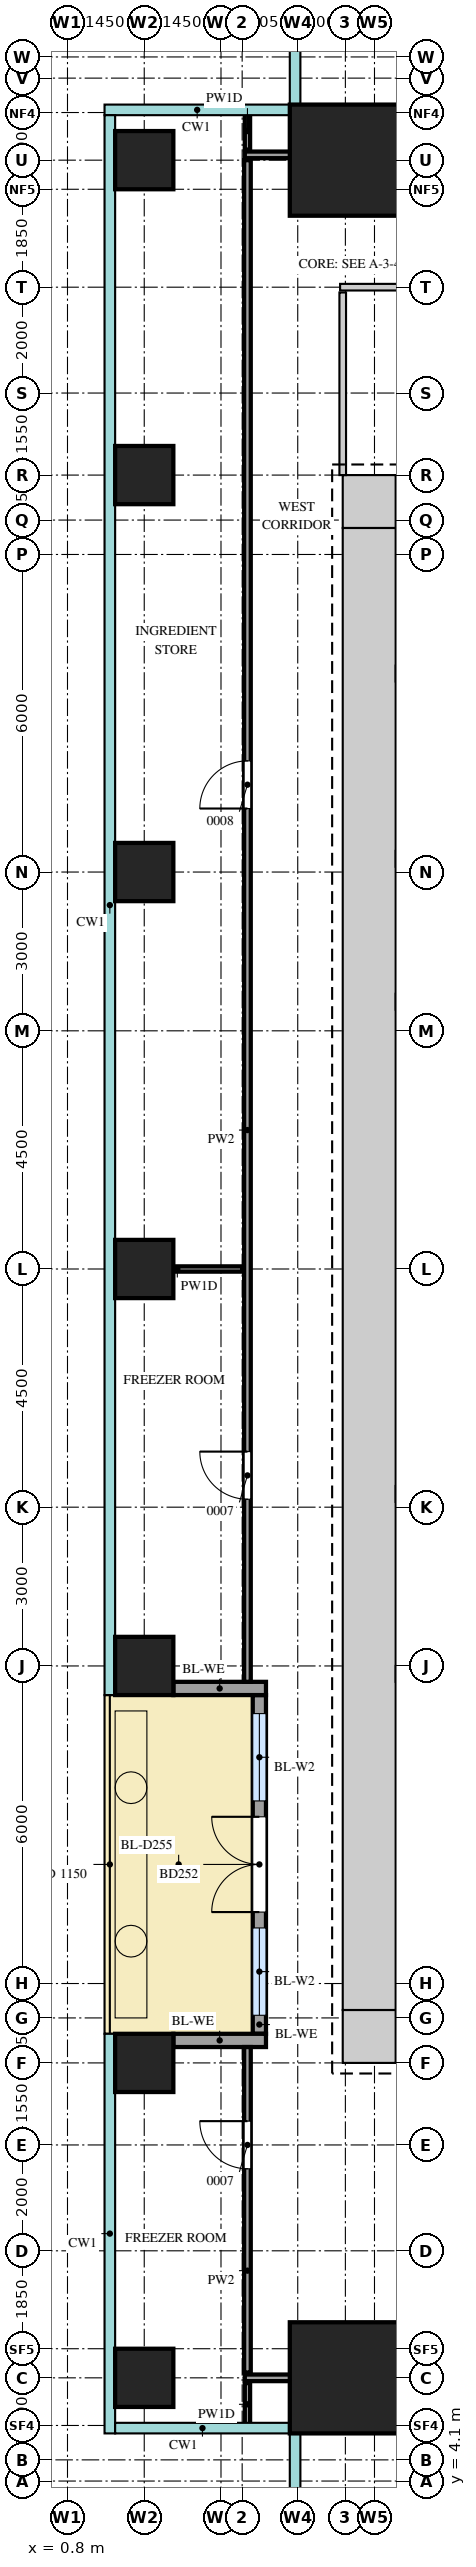
"""IFC4 building model, lengths in metres.
Left out: names, types, materials, properties, quantities, classifications, styles, units other than length and angle.
Written with IfcOpenShell. Run it as: python <this file> out.ifc"""

import sys

from ifc_helpers import new_model, si_unit, direction, frame, frame_2d, origin, origin_2d, place, context, subcontext, project, spatial, rectangle, extrude, source, transform, mapped, element, fill, save


model = new_model("IFC4")
c1 = context("Model", 3, precision=1e-05, world=origin(), true_north=direction((0.0, 1.0)))
c2 = subcontext(c1, "Body", "Model", "MODEL_VIEW")
j1 = project(units=[si_unit("LENGTHUNIT", "METRE"), si_unit("PLANEANGLEUNIT", "RADIAN")], contexts=[c1])
p1 = place(None, origin())
s1 = spatial("IfcSite", under=j1, at=p1, CompositionType="ELEMENT")
p2 = place(p1, origin())
s2 = spatial("IfcBuilding", under=s1, at=p2, CompositionType="ELEMENT")
p3 = place(p2, frame((0.0, 0.0, 119.1)))
s3 = spatial("IfcBuildingStorey", under=s2, at=p3, CompositionType="ELEMENT", Elevation=119.1)
m1 = source(origin(), c2, "Body", "SweptSolid", [
    extrude(rectangle(XDim=1.0, YDim=1.0, at=frame_2d((0.5, 0.0))), origin(), (0.0, 0.0, 1.0), 4.1),
])
for number, where, z_axis, x_axis in (
    (1, (6.0, 41.5, 0.0), (0.0, 0.0, 1.0), (1.0, 0.0, 0.0)),
    (2, (6.0, 12.5, 0.0), (0.0, 0.0, 1.0), (1.0, 0.0, 0.0)),
):
    element("IfcWall", number, at=place(p3, frame(where, z_axis=z_axis, x_axis=x_axis)), inside=s3, PredefinedType="SHEAR", context=c2, shape_type="MappedRepresentation", body=[
        mapped(m1, transform((0.0, 0.0, 0.0))),
    ])
m2 = source(origin(), c2, "Body", "SweptSolid", [
    extrude(rectangle(XDim=28.0, YDim=1.0, at=frame_2d((14.0, 0.0))), origin(), (0.0, 0.0, 1.0), 4.1),
])
p4 = place(p3, frame((6.5, 13.0, 0.0), z_axis=(0.0, 0.0, 1.0), x_axis=(0.0, 1.0, 0.0)))
e3 = element("IfcWall", 3, at=p4, inside=s3, PredefinedType="SHEAR", context=c2, shape_type="MappedRepresentation", body=[
    mapped(m2, transform((0.0, 0.0, 0.0))),
])
m3 = source(origin(), c2, "Body", "SweptSolid", [
    extrude(rectangle(XDim=2.1, YDim=2.1, at=origin_2d()), origin(), (0.0, 0.0, 1.0), 4.4),
])
for number, where, z_axis, x_axis in (
    (4, (6.05, 47.95, 0.0), (0.0, 0.0, 1.0), (1.0, 0.0, 0.0)),
    (5, (6.05, 6.05, 0.0), (0.0, 0.0, 1.0), (1.0, 0.0, 0.0)),
):
    element("IfcColumn", number, at=place(p3, frame(where, z_axis=z_axis, x_axis=x_axis)), inside=s3, PredefinedType="COLUMN", context=c2, shape_type="MappedRepresentation", body=[
        mapped(m3, transform((0.0, 0.0, 0.0))),
    ])
m4 = source(origin(), c2, "Body", "SweptSolid", [
    extrude(rectangle(XDim=1.1, YDim=1.1, at=origin_2d()), origin(), (0.0, 0.0, 1.0), 4.1),
])
for number, where, z_axis, x_axis in (
    (6, (2.25, 6.05, 0.0), (0.0, 0.0, 1.0), (1.0, 0.0, 0.0)),
    (7, (2.25, 12.0, 0.0), (0.0, 0.0, 1.0), (1.0, 0.0, 0.0)),
    (8, (2.25, 19.5, 0.0), (0.0, 0.0, 1.0), (1.0, 0.0, 0.0)),
    (9, (2.25, 27.0, 0.0), (0.0, 0.0, 1.0), (1.0, 0.0, 0.0)),
    (10, (2.25, 34.5, 0.0), (0.0, 0.0, 1.0), (1.0, 0.0, 0.0)),
    (11, (2.25, 42.0, 0.0), (0.0, 0.0, 1.0), (1.0, 0.0, 0.0)),
    (12, (2.25, 47.95, 0.0), (0.0, 0.0, 1.0), (1.0, 0.0, 0.0)),
):
    element("IfcColumn", number, at=place(p3, frame(where, z_axis=z_axis, x_axis=x_axis)), inside=s3, PredefinedType="COLUMN", context=c2, shape_type="MappedRepresentation", body=[
        mapped(m4, transform((0.0, 0.0, 0.0))),
    ])
m5 = source(origin(), c2, "Body", "SweptSolid", [
    extrude(rectangle(XDim=6.4, YDim=0.25, at=frame_2d((3.2, 0.0))), origin(), (0.0, 0.0, 1.0), 3.5),
])
p5 = place(p3, frame((4.425, 12.55, 0.0), z_axis=(0.0, 0.0, 1.0), x_axis=(0.0, 1.0, 0.0)))
e13 = element("IfcWall", 13, at=p5, inside=s3, PredefinedType="SOLIDWALL", context=c2, shape_type="MappedRepresentation", body=[
    mapped(m5, transform((0.0, 0.0, 0.0))),
])
m6 = source(origin(), c2, "Body", "SweptSolid", [
    extrude(rectangle(XDim=1.65, YDim=2.4, at=frame_2d((0.825, 1.2))), frame((0.0, 0.135, 0.0), z_axis=(0.0, -1.0, 0.0), x_axis=(1.0, 0.0, 0.0)), (0.0, 0.0, 1.0), 0.27),
])
p6 = place(p5, frame((0.35, 0.0, 0.0)))
e14 = element("IfcOpeningElement", 14, at=p6, cuts=e13, PredefinedType="OPENING", context=c2, shape_type="MappedRepresentation", body=[
    mapped(m6, transform((0.0, 0.0, 0.0))),
])
p7 = place(p5, frame((4.4, 0.0, 0.0)))
e15 = element("IfcOpeningElement", 15, at=p7, cuts=e13, PredefinedType="OPENING", context=c2, shape_type="MappedRepresentation", body=[
    mapped(m6, transform((0.0, 0.0, 0.0))),
])
m7 = source(origin(), c2, "Body", "SweptSolid", [
    extrude(rectangle(XDim=1.8, YDim=2.4, at=frame_2d((0.9, 1.2))), frame((0.0, 0.135, 0.0), z_axis=(0.0, -1.0, 0.0), x_axis=(1.0, 0.0, 0.0)), (0.0, 0.0, 1.0), 0.27),
])
p8 = place(p5, frame((2.3, 0.0, 0.0)))
e16 = element("IfcOpeningElement", 16, at=p8, cuts=e13, PredefinedType="OPENING", context=c2, shape_type="MappedRepresentation", body=[
    mapped(m7, transform((0.0, 0.0, 0.0))),
])
m8 = source(origin(), c2, "Body", "SweptSolid", [
    extrude(rectangle(XDim=1.75, YDim=0.25, at=frame_2d((0.875, 0.0))), origin(), (0.0, 0.0, 1.0), 3.5),
])
for number, where, z_axis, x_axis in (
    (17, (2.8, 12.425, 0.0), (0.0, 0.0, 1.0), (1.0, 0.0, 0.0)),
    (18, (2.8, 19.075, 0.0), (0.0, 0.0, 1.0), (1.0, 0.0, 0.0)),
):
    element("IfcWall", number, at=place(p3, frame(where, z_axis=z_axis, x_axis=x_axis)), inside=s3, PredefinedType="SOLIDWALL", context=c2, shape_type="MappedRepresentation", body=[
        mapped(m8, transform((0.0, 0.0, 0.0))),
    ])
m9 = source(origin(), c2, "Body", "SweptSolid", [
    extrude(rectangle(XDim=0.8, YDim=0.1, at=frame_2d((0.4, 0.0))), origin(), (0.0, 0.0, 1.0), 4.2),
])
p9 = place(p3, frame((4.2, 5.15, 0.0), z_axis=(0.0, 0.0, 1.0), x_axis=(0.0, 1.0, 0.0)))
e19 = element("IfcWall", 19, at=p9, inside=s3, PredefinedType="PARTITIONING", context=c2, shape_type="MappedRepresentation", body=[
    mapped(m9, transform((0.0, 0.0, 0.0))),
])
m10 = source(origin(), c2, "Body", "SweptSolid", [
    extrude(rectangle(XDim=22.3, YDim=0.125, at=frame_2d((11.15, 0.0))), origin(), (0.0, 0.0, 1.0), 3.55),
])
p10 = place(p3, frame((4.15, 6.05, 0.0), z_axis=(0.0, 0.0, 1.0), x_axis=(1.0, 0.0, 0.0)))
e20 = element("IfcWall", 20, at=p10, inside=s3, PredefinedType="PARTITIONING", context=c2, shape_type="MappedRepresentation", body=[
    mapped(m10, transform((0.0, 0.0, 0.0))),
])
m11 = source(origin(), c2, "Body", "SweptSolid", [
    extrude(rectangle(XDim=0.9, YDim=2.1, at=frame_2d((0.45, 1.05))), frame((0.0, 0.073, 0.0), z_axis=(0.0, -1.0, 0.0), x_axis=(1.0, 0.0, 0.0)), (0.0, 0.0, 1.0), 0.145),
])
p11 = place(p10, frame((7.25, 0.0, 0.0)))
e21 = element("IfcOpeningElement", 21, at=p11, cuts=e20, PredefinedType="OPENING", context=c2, shape_type="MappedRepresentation", body=[
    mapped(m11, transform((0.0, 0.0, 0.0))),
])
p12 = place(p10, frame((18.35, 0.0, 0.0)))
e22 = element("IfcOpeningElement", 22, at=p12, cuts=e20, PredefinedType="OPENING", context=c2, shape_type="MappedRepresentation", body=[
    mapped(m11, transform((0.0, 0.0, 0.0))),
])
m12 = source(origin(), c2, "Body", "SweptSolid", [
    extrude(rectangle(XDim=6.15, YDim=0.125, at=frame_2d((3.075, 0.0))), origin(), (0.0, 0.0, 1.0), 4.2),
])
p13 = place(p3, frame((4.2, 6.15, 0.0), z_axis=(0.0, 0.0, 1.0), x_axis=(0.0, 1.0, 0.0)))
e23 = element("IfcWall", 23, at=p13, inside=s3, PredefinedType="PARTITIONING", context=c2, shape_type="MappedRepresentation", body=[
    mapped(m12, transform((0.0, 0.0, 0.0))),
])
p14 = place(p13, frame((3.85, 0.0, 0.0)))
e24 = element("IfcOpeningElement", 24, at=p14, cuts=e23, PredefinedType="OPENING", context=c2, shape_type="MappedRepresentation", body=[
    mapped(m11, transform((0.0, 0.0, 0.0))),
])
m13 = source(origin(), c2, "Body", "SweptSolid", [
    extrude(rectangle(XDim=28.75, YDim=0.125, at=frame_2d((14.375, 0.0))), origin(), (0.0, 0.0, 1.0), 4.2),
])
p15 = place(p3, frame((4.2, 19.2, 0.0), z_axis=(0.0, 0.0, 1.0), x_axis=(0.0, 1.0, 0.0)))
e25 = element("IfcWall", 25, at=p15, inside=s3, PredefinedType="PARTITIONING", context=c2, shape_type="MappedRepresentation", body=[
    mapped(m13, transform((0.0, 0.0, 0.0))),
])
p16 = place(p15, frame((3.45, 0.0, 0.0)))
e26 = element("IfcOpeningElement", 26, at=p16, cuts=e25, PredefinedType="OPENING", context=c2, shape_type="MappedRepresentation", body=[
    mapped(m11, transform((0.0, 0.0, 0.0))),
])
p17 = place(p15, frame((16.5, 0.0, 0.0)))
e27 = element("IfcOpeningElement", 27, at=p17, cuts=e25, PredefinedType="OPENING", context=c2, shape_type="MappedRepresentation", body=[
    mapped(m11, transform((0.0, 0.0, 0.0))),
])
m14 = source(origin(), c2, "Body", "SweptSolid", [
    extrude(rectangle(XDim=2.45, YDim=0.1, at=frame_2d((1.225, 0.0))), origin(), (0.0, 0.0, 1.0), 4.2),
])
p18 = place(p3, frame((1.65, 27.0, 0.0), z_axis=(0.0, 0.0, 1.0), x_axis=(1.0, 0.0, 0.0)))
e28 = element("IfcWall", 28, at=p18, inside=s3, PredefinedType="PARTITIONING", context=c2, shape_type="MappedRepresentation", body=[
    mapped(m14, transform((0.0, 0.0, 0.0))),
])
m15 = source(origin(), c2, "Body", "SweptSolid", [
    extrude(rectangle(XDim=3.45, YDim=0.125, at=frame_2d((1.725, 0.0))), origin(), (0.0, 0.0, 1.0), 4.2),
])
p19 = place(p3, frame((6.0, 42.0, 0.0), z_axis=(0.0, 0.0, 1.0), x_axis=(0.0, 1.0, 0.0)))
e29 = element("IfcWall", 29, at=p19, inside=s3, PredefinedType="PARTITIONING", context=c2, shape_type="MappedRepresentation", body=[
    mapped(m15, transform((0.0, 0.0, 0.0))),
])
m16 = source(origin(), c2, "Body", "SweptSolid", [
    extrude(rectangle(XDim=7.95, YDim=0.125, at=frame_2d((3.975, 0.0))), origin(), (0.0, 0.0, 1.0), 4.2),
])
p20 = place(p3, frame((5.95, 45.55, 0.0), z_axis=(0.0, 0.0, 1.0), x_axis=(1.0, 0.0, 0.0)))
e30 = element("IfcWall", 30, at=p20, inside=s3, PredefinedType="PARTITIONING", context=c2, shape_type="MappedRepresentation", body=[
    mapped(m16, transform((0.0, 0.0, 0.0))),
])
p21 = place(p20, frame((1.55, 0.0, 0.0)))
e31 = element("IfcOpeningElement", 31, at=p21, cuts=e30, PredefinedType="OPENING", context=c2, shape_type="MappedRepresentation", body=[
    mapped(m11, transform((0.0, 0.0, 0.0))),
])
p22 = place(p20, frame((5.65, 0.0, 0.0)))
e32 = element("IfcOpeningElement", 32, at=p22, cuts=e30, PredefinedType="OPENING", context=c2, shape_type="MappedRepresentation", body=[
    mapped(m11, transform((0.0, 0.0, 0.0))),
])
m17 = source(origin(), c2, "Body", "SweptSolid", [
    extrude(rectangle(XDim=42.2, YDim=0.125, at=frame_2d((21.1, 0.0))), origin(), (0.0, 0.0, 1.0), 3.55),
])
p23 = place(p3, frame((4.15, 48.05, 0.0), z_axis=(0.0, 0.0, 1.0), x_axis=(1.0, 0.0, 0.0)))
e33 = element("IfcWall", 33, at=p23, inside=s3, PredefinedType="PARTITIONING", context=c2, shape_type="MappedRepresentation", body=[
    mapped(m17, transform((0.0, 0.0, 0.0))),
])
p24 = place(p23, frame((7.25, 0.0, 0.0)))
e34 = element("IfcOpeningElement", 34, at=p24, cuts=e33, PredefinedType="OPENING", context=c2, shape_type="MappedRepresentation", body=[
    mapped(m11, transform((0.0, 0.0, 0.0))),
])
p25 = place(p23, frame((22.55, 0.0, 0.0)))
e35 = element("IfcOpeningElement", 35, at=p25, cuts=e33, PredefinedType="OPENING", context=c2, shape_type="MappedRepresentation", body=[
    mapped(m11, transform((0.0, 0.0, 0.0))),
])
p26 = place(p23, frame((35.85, 0.0, 0.0)))
e36 = element("IfcOpeningElement", 36, at=p26, cuts=e33, PredefinedType="OPENING", context=c2, shape_type="MappedRepresentation", body=[
    mapped(m11, transform((0.0, 0.0, 0.0))),
])
m18 = source(origin(), c2, "Body", "SweptSolid", [
    extrude(rectangle(XDim=0.7, YDim=0.1, at=frame_2d((0.35, 0.0))), origin(), (0.0, 0.0, 1.0), 4.2),
])
p27 = place(p3, frame((4.2, 48.15, 0.0), z_axis=(0.0, 0.0, 1.0), x_axis=(0.0, 1.0, 0.0)))
e37 = element("IfcWall", 37, at=p27, inside=s3, PredefinedType="PARTITIONING", context=c2, shape_type="MappedRepresentation", body=[
    mapped(m18, transform((0.0, 0.0, 0.0))),
])
m19 = source(origin(), c2, "Body", "SweptSolid", [
    extrude(rectangle(XDim=1.65, YDim=2.4, at=frame_2d((0.825, 1.2))), frame((0.0, 0.03, 0.0), z_axis=(0.0, -1.0, 0.0), x_axis=(1.0, 0.0, 0.0)), (0.0, 0.0, 1.0), 0.06),
])
p28 = place(p6, origin())
e38 = element("IfcWindow", 38, at=p28, inside=s3, PartitioningType="SINGLE_PANEL", PredefinedType="WINDOW", context=c2, shape_type="MappedRepresentation", body=[
    mapped(m19, transform((0.0, 0.0, 0.0))),
])
fill(e14, e38)
p29 = place(p7, origin())
e39 = element("IfcWindow", 39, at=p29, inside=s3, PartitioningType="SINGLE_PANEL", PredefinedType="WINDOW", context=c2, shape_type="MappedRepresentation", body=[
    mapped(m19, transform((0.0, 0.0, 0.0))),
])
fill(e15, e39)
m20 = source(origin(), c2, "Body", "SweptSolid", [
    extrude(rectangle(XDim=1.8, YDim=2.4, at=frame_2d((0.9, 1.2))), frame((0.0, 0.025, 0.0), z_axis=(0.0, -1.0, 0.0), x_axis=(1.0, 0.0, 0.0)), (0.0, 0.0, 1.0), 0.05),
])
p30 = place(p8, origin())
e40 = element("IfcDoor", 40, at=p30, inside=s3, OperationType="DOUBLE_DOOR_DOUBLE_SWING", PredefinedType="DOOR", context=c2, shape_type="MappedRepresentation", body=[
    mapped(m20, transform((0.0, 0.0, 0.0))),
])
fill(e16, e40)
m21 = source(origin(), c2, "Body", "SweptSolid", [
    extrude(rectangle(XDim=0.9, YDim=2.1, at=frame_2d((0.45, 1.05))), frame((0.0, 0.025, 0.0), z_axis=(0.0, -1.0, 0.0), x_axis=(1.0, 0.0, 0.0)), (0.0, 0.0, 1.0), 0.05),
])
p31 = place(p14, origin())
e41 = element("IfcDoor", 41, at=p31, inside=s3, OperationType="SINGLE_SWING_LEFT", PredefinedType="DOOR", context=c2, shape_type="MappedRepresentation", body=[
    mapped(m21, transform((0.0, 0.0, 0.0))),
])
fill(e24, e41)
p32 = place(p16, origin())
e42 = element("IfcDoor", 42, at=p32, inside=s3, OperationType="SINGLE_SWING_LEFT", PredefinedType="DOOR", context=c2, shape_type="MappedRepresentation", body=[
    mapped(m21, transform((0.0, 0.0, 0.0))),
])
fill(e26, e42)
p33 = place(p17, origin())
e43 = element("IfcDoor", 43, at=p33, inside=s3, OperationType="SINGLE_SWING_RIGHT", PredefinedType="DOOR", context=c2, shape_type="MappedRepresentation", body=[
    mapped(m21, transform((0.0, 0.0, 0.0))),
])
fill(e27, e43)
save(model, sys.argv[1])
